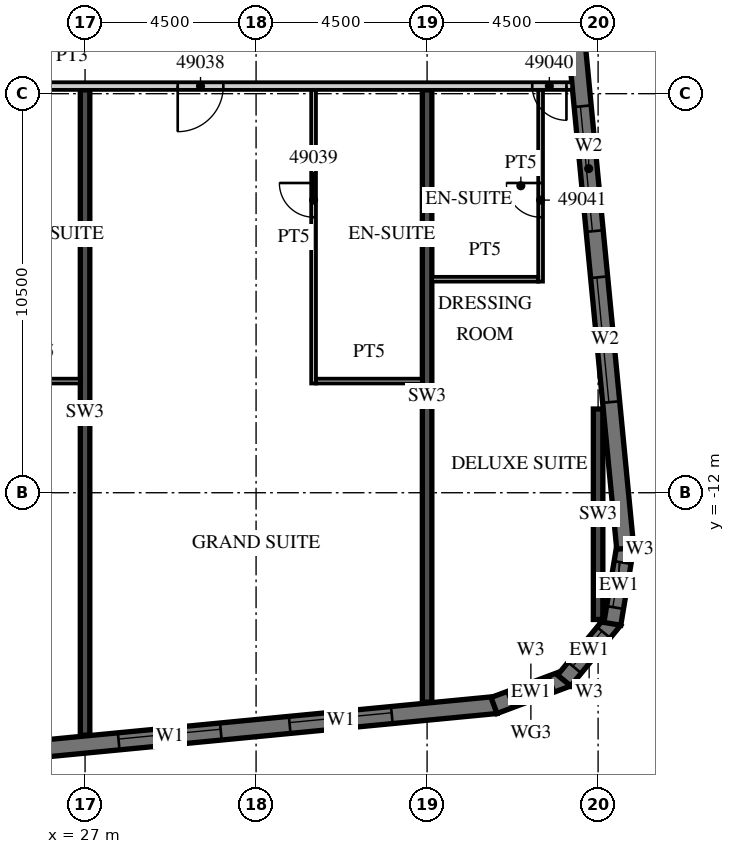
"""IFC4 building model, lengths in metres.
Left out: names, types, materials, properties, quantities, classifications, styles, units other than length and angle.
Written with IfcOpenShell. Run it as: python <this file> out.ifc"""

import sys

from ifc_helpers import new_model, si_unit, direction, frame, frame_2d, origin, place, context, subcontext, project, spatial, polyline, rectangle, outline, extrude, element, fill, save


model = new_model("IFC4")
c1 = context("Model", 3, precision=1e-05, world=origin(), true_north=direction((0.0, 1.0)))
c2 = subcontext(c1, "Body", "Model", "MODEL_VIEW")
j1 = project(units=[si_unit("LENGTHUNIT", "METRE"), si_unit("PLANEANGLEUNIT", "RADIAN")], contexts=[c1])
p1 = place(None, origin())
s1 = spatial("IfcSite", under=j1, at=p1, CompositionType="ELEMENT")
p2 = place(p1, origin())
s2 = spatial("IfcBuilding", under=s1, at=p2, CompositionType="ELEMENT")
p3 = place(p2, frame((0.0, 0.0, 203.2)))
s3 = spatial("IfcBuildingStorey", under=s2, at=p3, CompositionType="ELEMENT", Elevation=203.2)
p4 = place(p3, frame((27.0, -18.379, 0.0), z_axis=(0.0, 0.0, 1.0), x_axis=(0.0, 1.0, 0.0)))
e1 = element("IfcWall", 1, at=p4, inside=s3, PredefinedType="SHEAR", context=c2, shape_type="SweptSolid", body=[
    extrude(rectangle(XDim=16.979, YDim=0.25, at=frame_2d((8.489, 0.0))), origin(), (0.0, 0.0, 1.0), 3.0),
])
p5 = place(p3, frame((36.0, -17.512, 0.0), z_axis=(0.0, 0.0, 1.0), x_axis=(0.0, 1.0, 0.0)))
e2 = element("IfcWall", 2, at=p5, inside=s3, PredefinedType="SHEAR", context=c2, shape_type="SweptSolid", body=[
    extrude(rectangle(XDim=16.112, YDim=0.25, at=frame_2d((8.056, 0.0))), origin(), (0.0, 0.0, 1.0), 3.0),
])
p6 = place(p3, frame((40.5, -15.335, 0.0), z_axis=(0.0, 0.0, 1.0), x_axis=(0.0, 1.0, 0.0)))
e3 = element("IfcWall", 3, at=p6, inside=s3, PredefinedType="SHEAR", context=c2, shape_type="SweptSolid", body=[
    extrude(rectangle(XDim=5.538, YDim=0.25, at=frame_2d((2.769, 0.0))), origin(), (0.0, 0.0, 1.0), 3.0),
])
p7 = place(p3, frame((-13.521, -22.529, 0.0), z_axis=(0.0, 0.0, 1.0), x_axis=(0.995396436651, 0.095843277819, 0.0)))
e4 = element("IfcWall", 4, at=p7, inside=s3, PredefinedType="SOLIDWALL", context=c2, shape_type="SweptSolid", body=[
    extrude(rectangle(XDim=51.578, YDim=0.45, at=frame_2d((25.789, 0.0))), origin(), (0.0, 0.0, 1.0), 3.0),
])
p8 = place(p7, frame((0.91, 0.0, 0.45)))
e5 = element("IfcOpeningElement", 5, at=p8, cuts=e4, PredefinedType="OPENING", context=c2, shape_type="SweptSolid", body=[
    extrude(rectangle(XDim=2.7, YDim=2.25, at=frame_2d((1.35, 1.125))), frame((0.0, 0.235, 0.0), z_axis=(0.0, -1.0, 0.0), x_axis=(1.0, 0.0, 0.0)), (0.0, 0.0, 1.0), 0.47),
])
p9 = place(p7, frame((5.431, 0.0, 0.45)))
e6 = element("IfcOpeningElement", 6, at=p9, cuts=e4, PredefinedType="OPENING", context=c2, shape_type="SweptSolid", body=[
    extrude(rectangle(XDim=2.7, YDim=2.25, at=frame_2d((1.35, 1.125))), frame((0.0, 0.235, 0.0), z_axis=(0.0, -1.0, 0.0), x_axis=(1.0, 0.0, 0.0)), (0.0, 0.0, 1.0), 0.47),
])
p10 = place(p7, frame((9.952, 0.0, 0.45)))
e7 = element("IfcOpeningElement", 7, at=p10, cuts=e4, PredefinedType="OPENING", context=c2, shape_type="SweptSolid", body=[
    extrude(rectangle(XDim=2.7, YDim=2.25, at=frame_2d((1.35, 1.125))), frame((0.0, 0.235, 0.0), z_axis=(0.0, -1.0, 0.0), x_axis=(1.0, 0.0, 0.0)), (0.0, 0.0, 1.0), 0.47),
])
p11 = place(p7, frame((14.473, 0.0, 0.45)))
e8 = element("IfcOpeningElement", 8, at=p11, cuts=e4, PredefinedType="OPENING", context=c2, shape_type="SweptSolid", body=[
    extrude(rectangle(XDim=2.7, YDim=2.25, at=frame_2d((1.35, 1.125))), frame((0.0, 0.235, 0.0), z_axis=(0.0, -1.0, 0.0), x_axis=(1.0, 0.0, 0.0)), (0.0, 0.0, 1.0), 0.47),
])
p12 = place(p7, frame((18.994, 0.0, 0.45)))
e9 = element("IfcOpeningElement", 9, at=p12, cuts=e4, PredefinedType="OPENING", context=c2, shape_type="SweptSolid", body=[
    extrude(rectangle(XDim=2.7, YDim=2.25, at=frame_2d((1.35, 1.125))), frame((0.0, 0.235, 0.0), z_axis=(0.0, -1.0, 0.0), x_axis=(1.0, 0.0, 0.0)), (0.0, 0.0, 1.0), 0.47),
])
p13 = place(p7, frame((23.514, 0.0, 0.45)))
e10 = element("IfcOpeningElement", 10, at=p13, cuts=e4, PredefinedType="OPENING", context=c2, shape_type="SweptSolid", body=[
    extrude(rectangle(XDim=2.7, YDim=2.25, at=frame_2d((1.35, 1.125))), frame((0.0, 0.235, 0.0), z_axis=(0.0, -1.0, 0.0), x_axis=(1.0, 0.0, 0.0)), (0.0, 0.0, 1.0), 0.47),
])
p14 = place(p7, frame((28.035, 0.0, 0.45)))
e11 = element("IfcOpeningElement", 11, at=p14, cuts=e4, PredefinedType="OPENING", context=c2, shape_type="SweptSolid", body=[
    extrude(rectangle(XDim=2.7, YDim=2.25, at=frame_2d((1.35, 1.125))), frame((0.0, 0.235, 0.0), z_axis=(0.0, -1.0, 0.0), x_axis=(1.0, 0.0, 0.0)), (0.0, 0.0, 1.0), 0.47),
])
p15 = place(p7, frame((32.556, 0.0, 0.45)))
e12 = element("IfcOpeningElement", 12, at=p15, cuts=e4, PredefinedType="OPENING", context=c2, shape_type="SweptSolid", body=[
    extrude(rectangle(XDim=2.7, YDim=2.25, at=frame_2d((1.35, 1.125))), frame((0.0, 0.235, 0.0), z_axis=(0.0, -1.0, 0.0), x_axis=(1.0, 0.0, 0.0)), (0.0, 0.0, 1.0), 0.47),
])
p16 = place(p7, frame((37.077, 0.0, 0.45)))
e13 = element("IfcOpeningElement", 13, at=p16, cuts=e4, PredefinedType="OPENING", context=c2, shape_type="SweptSolid", body=[
    extrude(rectangle(XDim=2.7, YDim=2.25, at=frame_2d((1.35, 1.125))), frame((0.0, 0.235, 0.0), z_axis=(0.0, -1.0, 0.0), x_axis=(1.0, 0.0, 0.0)), (0.0, 0.0, 1.0), 0.47),
])
p17 = place(p7, frame((41.598, 0.0, 0.45)))
e14 = element("IfcOpeningElement", 14, at=p17, cuts=e4, PredefinedType="OPENING", context=c2, shape_type="SweptSolid", body=[
    extrude(rectangle(XDim=2.7, YDim=2.25, at=frame_2d((1.35, 1.125))), frame((0.0, 0.235, 0.0), z_axis=(0.0, -1.0, 0.0), x_axis=(1.0, 0.0, 0.0)), (0.0, 0.0, 1.0), 0.47),
])
p18 = place(p7, frame((46.119, 0.0, 0.45)))
e15 = element("IfcOpeningElement", 15, at=p18, cuts=e4, PredefinedType="OPENING", context=c2, shape_type="SweptSolid", body=[
    extrude(rectangle(XDim=2.7, YDim=2.25, at=frame_2d((1.35, 1.125))), frame((0.0, 0.235, 0.0), z_axis=(0.0, -1.0, 0.0), x_axis=(1.0, 0.0, 0.0)), (0.0, 0.0, 1.0), 0.47),
])
p19 = place(p3, frame((37.761, -17.598, 0.0), z_axis=(0.0, 0.0, 1.0), x_axis=(0.936677599948, 0.350192909346, 0.0)))
e16 = element("IfcWall", 16, at=p19, inside=s3, PredefinedType="SOLIDWALL", context=c2, shape_type="SweptSolid", body=[
    extrude(outline(polyline([(0.0, -0.225), (2.071, -0.225), (1.95, 0.225), (0.121, 0.225), (0.0, -0.225)])), origin(), (0.0, 0.0, 1.0), 3.0),
])
p20 = place(p19, frame((0.435, 0.0, 0.45)))
e17 = element("IfcOpeningElement", 17, at=p20, cuts=e16, PredefinedType="OPENING", context=c2, shape_type="SweptSolid", body=[
    extrude(rectangle(XDim=1.2, YDim=2.25, at=frame_2d((0.6, 1.125))), frame((0.0, 0.235, 0.0), z_axis=(0.0, -1.0, 0.0), x_axis=(1.0, 0.0, 0.0)), (0.0, 0.0, 1.0), 0.47),
])
p21 = place(p3, frame((39.606, -16.941, 0.0), z_axis=(0.0, 0.0, 1.0), x_axis=(0.636116318187, 0.771593176315, 0.0)))
e18 = element("IfcWall", 18, at=p21, inside=s3, PredefinedType="SOLIDWALL", context=c2, shape_type="SweptSolid", body=[
    extrude(outline(polyline([(0.0, -0.225), (2.071, -0.225), (1.95, 0.225), (0.121, 0.225), (0.0, -0.225)])), origin(), (0.0, 0.0, 1.0), 3.0),
])
p22 = place(p21, frame((0.435, 0.0, 0.45)))
e19 = element("IfcOpeningElement", 19, at=p22, cuts=e18, PredefinedType="OPENING", context=c2, shape_type="SweptSolid", body=[
    extrude(rectangle(XDim=1.2, YDim=2.25, at=frame_2d((0.6, 1.125))), frame((0.0, 0.235, 0.0), z_axis=(0.0, -1.0, 0.0), x_axis=(1.0, 0.0, 0.0)), (0.0, 0.0, 1.0), 0.47),
])
p23 = place(p3, frame((40.875, -15.449, 0.0), z_axis=(0.0, 0.0, 1.0), x_axis=(0.164953448126, 0.986301353518, 0.0)))
e20 = element("IfcWall", 20, at=p23, inside=s3, PredefinedType="SOLIDWALL", context=c2, shape_type="SweptSolid", body=[
    extrude(outline(polyline([(0.0, -0.225), (2.071, -0.225), (1.95, 0.225), (0.121, 0.225), (0.0, -0.225)])), origin(), (0.0, 0.0, 1.0), 3.0),
])
p24 = place(p23, frame((0.435, 0.0, 0.45)))
e21 = element("IfcOpeningElement", 21, at=p24, cuts=e20, PredefinedType="OPENING", context=c2, shape_type="SweptSolid", body=[
    extrude(rectangle(XDim=1.2, YDim=2.25, at=frame_2d((0.6, 1.125))), frame((0.0, 0.235, 0.0), z_axis=(0.0, -1.0, 0.0), x_axis=(1.0, 0.0, 0.0)), (0.0, 0.0, 1.0), 0.47),
])
p25 = place(p3, frame((41.214, -13.466, 0.0), z_axis=(0.0, 0.0, 1.0), x_axis=(-0.095847314626, 0.995396047952, 0.0)))
e22 = element("IfcWall", 22, at=p25, inside=s3, PredefinedType="SOLIDWALL", context=c2, shape_type="SweptSolid", body=[
    extrude(rectangle(XDim=34.0, YDim=0.45, at=frame_2d((17.0, 0.0))), origin(), (0.0, 0.0, 1.0), 3.0),
])
p26 = place(p25, frame((3.869, 0.0, 0.45)))
e23 = element("IfcOpeningElement", 23, at=p26, cuts=e22, PredefinedType="OPENING", context=c2, shape_type="SweptSolid", body=[
    extrude(rectangle(XDim=3.3, YDim=2.25, at=frame_2d((1.65, 1.125))), frame((0.0, 0.235, 0.0), z_axis=(0.0, -1.0, 0.0), x_axis=(1.0, 0.0, 0.0)), (0.0, 0.0, 1.0), 0.47),
])
p27 = place(p25, frame((8.39, 0.0, 0.45)))
e24 = element("IfcOpeningElement", 24, at=p27, cuts=e22, PredefinedType="OPENING", context=c2, shape_type="SweptSolid", body=[
    extrude(rectangle(XDim=3.3, YDim=2.25, at=frame_2d((1.65, 1.125))), frame((0.0, 0.235, 0.0), z_axis=(0.0, -1.0, 0.0), x_axis=(1.0, 0.0, 0.0)), (0.0, 0.0, 1.0), 0.47),
])
p28 = place(p3, frame((13.5, -1.3, 0.0), z_axis=(0.0, 0.0, 1.0), x_axis=(1.0, 0.0, 0.0)))
e25 = element("IfcWall", 25, at=p28, inside=s3, PredefinedType="PARTITIONING", context=c2, shape_type="SweptSolid", body=[
    extrude(rectangle(XDim=26.317, YDim=0.2, at=frame_2d((13.158, 0.0))), origin(), (0.0, 0.0, 1.0), 3.0),
])
p29 = place(p28, frame((0.575, 0.0, 0.0)))
e26 = element("IfcOpeningElement", 26, at=p29, cuts=e25, PredefinedType="OPENING", context=c2, shape_type="SweptSolid", body=[
    extrude(rectangle(XDim=1.0, YDim=2.1, at=frame_2d((0.5, 1.05))), frame((0.0, 0.11, 0.0), z_axis=(0.0, -1.0, 0.0), x_axis=(1.0, 0.0, 0.0)), (0.0, 0.0, 1.0), 0.22),
])
p30 = place(p28, frame((7.45, 0.0, 0.0)))
e27 = element("IfcOpeningElement", 27, at=p30, cuts=e25, PredefinedType="OPENING", context=c2, shape_type="SweptSolid", body=[
    extrude(rectangle(XDim=1.0, YDim=2.1, at=frame_2d((0.5, 1.05))), frame((0.0, 0.11, 0.0), z_axis=(0.0, -1.0, 0.0), x_axis=(1.0, 0.0, 0.0)), (0.0, 0.0, 1.0), 0.22),
])
p31 = place(p28, frame((9.55, 0.0, 0.0)))
e28 = element("IfcOpeningElement", 28, at=p31, cuts=e25, PredefinedType="OPENING", context=c2, shape_type="SweptSolid", body=[
    extrude(rectangle(XDim=1.0, YDim=2.1, at=frame_2d((0.5, 1.05))), frame((0.0, 0.11, 0.0), z_axis=(0.0, -1.0, 0.0), x_axis=(1.0, 0.0, 0.0)), (0.0, 0.0, 1.0), 0.22),
])
p32 = place(p28, frame((15.938, 0.0, 0.0)))
e29 = element("IfcOpeningElement", 29, at=p32, cuts=e25, PredefinedType="OPENING", context=c2, shape_type="SweptSolid", body=[
    extrude(rectangle(XDim=1.2, YDim=2.1, at=frame_2d((0.6, 1.05))), frame((0.0, 0.11, 0.0), z_axis=(0.0, -1.0, 0.0), x_axis=(1.0, 0.0, 0.0)), (0.0, 0.0, 1.0), 0.22),
])
p33 = place(p28, frame((25.267, 0.0, 0.0)))
e30 = element("IfcOpeningElement", 30, at=p33, cuts=e25, PredefinedType="OPENING", context=c2, shape_type="SweptSolid", body=[
    extrude(rectangle(XDim=0.9, YDim=2.1, at=frame_2d((0.45, 1.05))), frame((0.0, 0.11, 0.0), z_axis=(0.0, -1.0, 0.0), x_axis=(1.0, 0.0, 0.0)), (0.0, 0.0, 1.0), 0.22),
])
p34 = place(p3, frame((24.625, -9.062, 0.0), z_axis=(0.0, 0.0, 1.0), x_axis=(1.0, 0.0, 0.0)))
e31 = element("IfcWall", 31, at=p34, inside=s3, PredefinedType="PARTITIONING", context=c2, shape_type="SweptSolid", body=[
    extrude(rectangle(XDim=2.25, YDim=0.125, at=frame_2d((1.125, 0.0))), origin(), (0.0, 0.0, 1.0), 3.0),
])
p35 = place(p3, frame((33.013, -9.125, 0.0), z_axis=(0.0, 0.0, 1.0), x_axis=(0.0, 1.0, 0.0)))
e32 = element("IfcWall", 32, at=p35, inside=s3, PredefinedType="PARTITIONING", context=c2, shape_type="SweptSolid", body=[
    extrude(rectangle(XDim=7.725, YDim=0.125, at=frame_2d((3.863, 0.0))), origin(), (0.0, 0.0, 1.0), 3.0),
])
p36 = place(p35, frame((4.375, 0.0, 0.0)))
e33 = element("IfcOpeningElement", 33, at=p36, cuts=e32, PredefinedType="OPENING", context=c2, shape_type="SweptSolid", body=[
    extrude(rectangle(XDim=0.9, YDim=2.1, at=frame_2d((0.45, 1.05))), frame((0.0, 0.073, 0.0), z_axis=(0.0, -1.0, 0.0), x_axis=(1.0, 0.0, 0.0)), (0.0, 0.0, 1.0), 0.145),
])
p37 = place(p3, frame((33.075, -9.062, 0.0), z_axis=(0.0, 0.0, 1.0), x_axis=(1.0, 0.0, 0.0)))
e34 = element("IfcWall", 34, at=p37, inside=s3, PredefinedType="PARTITIONING", context=c2, shape_type="SweptSolid", body=[
    extrude(rectangle(XDim=2.8, YDim=0.125, at=frame_2d((1.4, 0.0))), origin(), (0.0, 0.0, 1.0), 3.0),
])
p38 = place(p3, frame((38.987, -6.445, 0.0), z_axis=(0.0, 0.0, 1.0), x_axis=(0.0, 1.0, 0.0)))
e35 = element("IfcWall", 35, at=p38, inside=s3, PredefinedType="PARTITIONING", context=c2, shape_type="SweptSolid", body=[
    extrude(rectangle(XDim=5.045, YDim=0.125, at=frame_2d((2.522, 0.0))), origin(), (0.0, 0.0, 1.0), 3.0),
])
p39 = place(p38, frame((1.695, 0.0, 0.0)))
e36 = element("IfcOpeningElement", 36, at=p39, cuts=e35, PredefinedType="OPENING", context=c2, shape_type="SweptSolid", body=[
    extrude(rectangle(XDim=0.9, YDim=2.1, at=frame_2d((0.45, 1.05))), frame((0.0, 0.073, 0.0), z_axis=(0.0, -1.0, 0.0), x_axis=(1.0, 0.0, 0.0)), (0.0, 0.0, 1.0), 0.145),
])
p40 = place(p3, frame((36.125, -6.382, 0.0), z_axis=(0.0, 0.0, 1.0), x_axis=(1.0, 0.0, 0.0)))
e37 = element("IfcWall", 37, at=p40, inside=s3, PredefinedType="PARTITIONING", context=c2, shape_type="SweptSolid", body=[
    extrude(rectangle(XDim=2.8, YDim=0.125, at=frame_2d((1.4, 0.0))), origin(), (0.0, 0.0, 1.0), 3.0),
])
p41 = place(p17, origin())
e38 = element("IfcWindow", 38, at=p41, inside=s3, PartitioningType="SINGLE_PANEL", PredefinedType="WINDOW", context=c2, shape_type="SweptSolid", body=[
    extrude(rectangle(XDim=2.7, YDim=2.25, at=frame_2d((1.35, 1.125))), frame((0.0, 0.09, 0.0), z_axis=(0.0, -1.0, 0.0), x_axis=(1.0, 0.0, 0.0)), (0.0, 0.0, 1.0), 0.06),
])
fill(e14, e38)
p42 = place(p18, origin())
e39 = element("IfcWindow", 39, at=p42, inside=s3, PartitioningType="SINGLE_PANEL", PredefinedType="WINDOW", context=c2, shape_type="SweptSolid", body=[
    extrude(rectangle(XDim=2.7, YDim=2.25, at=frame_2d((1.35, 1.125))), frame((0.0, 0.09, 0.0), z_axis=(0.0, -1.0, 0.0), x_axis=(1.0, 0.0, 0.0)), (0.0, 0.0, 1.0), 0.06),
])
fill(e15, e39)
p43 = place(p20, origin())
e40 = element("IfcWindow", 40, at=p43, inside=s3, PartitioningType="SINGLE_PANEL", PredefinedType="WINDOW", context=c2, shape_type="SweptSolid", body=[
    extrude(rectangle(XDim=1.2, YDim=2.25, at=frame_2d((0.6, 1.125))), frame((0.0, 0.09, 0.0), z_axis=(0.0, -1.0, 0.0), x_axis=(1.0, 0.0, 0.0)), (0.0, 0.0, 1.0), 0.06),
])
fill(e17, e40)
p44 = place(p22, origin())
e41 = element("IfcWindow", 41, at=p44, inside=s3, PartitioningType="SINGLE_PANEL", PredefinedType="WINDOW", context=c2, shape_type="SweptSolid", body=[
    extrude(rectangle(XDim=1.2, YDim=2.25, at=frame_2d((0.6, 1.125))), frame((0.0, 0.09, 0.0), z_axis=(0.0, -1.0, 0.0), x_axis=(1.0, 0.0, 0.0)), (0.0, 0.0, 1.0), 0.06),
])
fill(e19, e41)
p45 = place(p24, origin())
e42 = element("IfcWindow", 42, at=p45, inside=s3, PartitioningType="SINGLE_PANEL", PredefinedType="WINDOW", context=c2, shape_type="SweptSolid", body=[
    extrude(rectangle(XDim=1.2, YDim=2.25, at=frame_2d((0.6, 1.125))), frame((0.0, 0.09, 0.0), z_axis=(0.0, -1.0, 0.0), x_axis=(1.0, 0.0, 0.0)), (0.0, 0.0, 1.0), 0.06),
])
fill(e21, e42)
p46 = place(p26, origin())
e43 = element("IfcWindow", 43, at=p46, inside=s3, PartitioningType="SINGLE_PANEL", PredefinedType="WINDOW", context=c2, shape_type="SweptSolid", body=[
    extrude(rectangle(XDim=3.3, YDim=2.25, at=frame_2d((1.65, 1.125))), frame((0.0, 0.09, 0.0), z_axis=(0.0, -1.0, 0.0), x_axis=(1.0, 0.0, 0.0)), (0.0, 0.0, 1.0), 0.06),
])
fill(e23, e43)
p47 = place(p27, origin())
e44 = element("IfcWindow", 44, at=p47, inside=s3, PartitioningType="SINGLE_PANEL", PredefinedType="WINDOW", context=c2, shape_type="SweptSolid", body=[
    extrude(rectangle(XDim=3.3, YDim=2.25, at=frame_2d((1.65, 1.125))), frame((0.0, 0.09, 0.0), z_axis=(0.0, -1.0, 0.0), x_axis=(1.0, 0.0, 0.0)), (0.0, 0.0, 1.0), 0.06),
])
fill(e24, e44)
p48 = place(p32, origin())
e45 = element("IfcDoor", 45, at=p48, inside=s3, OperationType="SINGLE_SWING_LEFT", PredefinedType="DOOR", context=c2, shape_type="SweptSolid", body=[
    extrude(rectangle(XDim=1.2, YDim=2.1, at=frame_2d((0.6, 1.05))), frame((0.0, 0.025, 0.0), z_axis=(0.0, -1.0, 0.0), x_axis=(1.0, 0.0, 0.0)), (0.0, 0.0, 1.0), 0.05),
])
fill(e29, e45)
p49 = place(p36, origin())
e46 = element("IfcDoor", 46, at=p49, inside=s3, OperationType="SINGLE_SWING_RIGHT", PredefinedType="DOOR", context=c2, shape_type="SweptSolid", body=[
    extrude(rectangle(XDim=0.9, YDim=2.1, at=frame_2d((0.45, 1.05))), frame((0.0, 0.025, 0.0), z_axis=(0.0, -1.0, 0.0), x_axis=(1.0, 0.0, 0.0)), (0.0, 0.0, 1.0), 0.05),
])
fill(e33, e46)
p50 = place(p33, origin())
e47 = element("IfcDoor", 47, at=p50, inside=s3, OperationType="SINGLE_SWING_RIGHT", PredefinedType="DOOR", context=c2, shape_type="SweptSolid", body=[
    extrude(rectangle(XDim=0.9, YDim=2.1, at=frame_2d((0.45, 1.05))), frame((0.0, 0.025, 0.0), z_axis=(0.0, -1.0, 0.0), x_axis=(1.0, 0.0, 0.0)), (0.0, 0.0, 1.0), 0.05),
])
fill(e30, e47)
p51 = place(p39, origin())
e48 = element("IfcDoor", 48, at=p51, inside=s3, OperationType="SINGLE_SWING_RIGHT", PredefinedType="DOOR", context=c2, shape_type="SweptSolid", body=[
    extrude(rectangle(XDim=0.9, YDim=2.1, at=frame_2d((0.45, 1.05))), frame((0.0, 0.025, 0.0), z_axis=(0.0, -1.0, 0.0), x_axis=(1.0, 0.0, 0.0)), (0.0, 0.0, 1.0), 0.05),
])
fill(e36, e48)
save(model, sys.argv[1])
